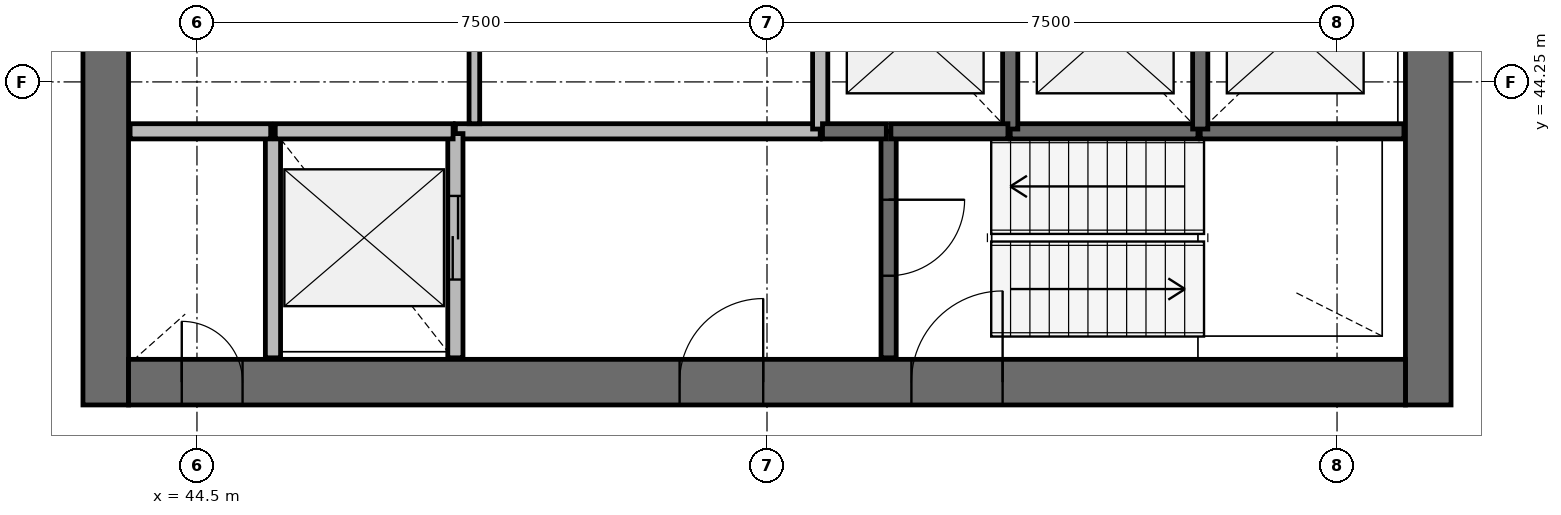
"""IFC4 building model, lengths in metres.
Left out: names, types, materials, properties, quantities, classifications, styles, units other than length and angle.
Written with IfcOpenShell. Run it as: python <this file> out.ifc"""

import sys

from ifc_helpers import new_model, si_unit, direction, frame, frame_2d, origin, place, context, subcontext, project, spatial, rectangle, extrude, source, transform, mapped, element, fill, save


model = new_model("IFC4")
c1 = context("Model", 3, precision=1e-05, world=origin(), true_north=direction((0.0, 1.0)))
c2 = subcontext(c1, "Body", "Model", "MODEL_VIEW")
j1 = project(units=[si_unit("LENGTHUNIT", "METRE"), si_unit("PLANEANGLEUNIT", "RADIAN")], contexts=[c1])
p1 = place(None, origin())
s1 = spatial("IfcSite", under=j1, at=p1, CompositionType="ELEMENT")
p2 = place(p1, origin())
s2 = spatial("IfcBuilding", under=s1, at=p2, CompositionType="ELEMENT")
p3 = place(p2, frame((0.0, 0.0, 218.9)))
s3 = spatial("IfcBuildingStorey", under=s2, at=p3, CompositionType="ELEMENT", Elevation=218.9)
p4 = place(p3, frame((60.7, 40.0, 0.0), z_axis=(0.0, 0.0, 1.0), x_axis=(0.0, 1.0, 0.0)))
e1 = element("IfcWall", 1, at=p4, inside=s3, PredefinedType="SHEAR", context=c2, shape_type="SweptSolid", body=[
    extrude(rectangle(XDim=16.0, YDim=0.6, at=frame_2d((8.0, 0.0))), origin(), (0.0, 0.0, 1.0), 3.9),
])
p5 = place(p4, frame((7.1, 0.0, 0.0)))
e2 = element("IfcOpeningElement", 2, at=p5, cuts=e1, PredefinedType="OPENING", context=c2, shape_type="SweptSolid", body=[
    extrude(rectangle(XDim=1.8, YDim=2.1, at=frame_2d((0.9, 1.05))), frame((0.0, 0.31, 0.0), z_axis=(0.0, -1.0, 0.0), x_axis=(1.0, 0.0, 0.0)), (0.0, 0.0, 1.0), 0.62),
])
p6 = place(p3, frame((43.3, 56.0, 0.0), z_axis=(0.0, 0.0, 1.0), x_axis=(0.0, -1.0, 0.0)))
e3 = element("IfcWall", 3, at=p6, inside=s3, PredefinedType="SHEAR", context=c2, shape_type="SweptSolid", body=[
    extrude(rectangle(XDim=16.0, YDim=0.6, at=frame_2d((8.0, 0.0))), origin(), (0.0, 0.0, 1.0), 3.9),
])
p7 = place(p6, frame((7.1, 0.0, 0.0)))
e4 = element("IfcOpeningElement", 4, at=p7, cuts=e3, PredefinedType="OPENING", context=c2, shape_type="SweptSolid", body=[
    extrude(rectangle(XDim=1.8, YDim=2.1, at=frame_2d((0.9, 1.05))), frame((0.0, 0.31, 0.0), z_axis=(0.0, -1.0, 0.0), x_axis=(1.0, 0.0, 0.0)), (0.0, 0.0, 1.0), 0.62),
])
p8 = place(p3, frame((43.6, 40.3, 0.0), z_axis=(0.0, 0.0, 1.0), x_axis=(1.0, 0.0, 0.0)))
e5 = element("IfcWall", 5, at=p8, inside=s3, PredefinedType="SHEAR", context=c2, shape_type="SweptSolid", body=[
    extrude(rectangle(XDim=16.8, YDim=0.6, at=frame_2d((8.4, 0.0))), origin(), (0.0, 0.0, 1.0), 3.9),
])
p9 = place(p8, frame((10.3, 0.0, 0.0)))
e6 = element("IfcOpeningElement", 6, at=p9, cuts=e5, PredefinedType="OPENING", context=c2, shape_type="SweptSolid", body=[
    extrude(rectangle(XDim=1.2, YDim=2.1, at=frame_2d((0.6, 1.05))), frame((0.0, 0.31, 0.0), z_axis=(0.0, -1.0, 0.0), x_axis=(1.0, 0.0, 0.0)), (0.0, 0.0, 1.0), 0.62),
])
p10 = place(p8, frame((7.25, 0.0, 0.0)))
e7 = element("IfcOpeningElement", 7, at=p10, cuts=e5, PredefinedType="OPENING", context=c2, shape_type="SweptSolid", body=[
    extrude(rectangle(XDim=1.1, YDim=2.1, at=frame_2d((0.55, 1.05))), frame((0.0, 0.31, 0.0), z_axis=(0.0, -1.0, 0.0), x_axis=(1.0, 0.0, 0.0)), (0.0, 0.0, 1.0), 0.62),
])
p11 = place(p8, frame((0.7, 0.0, 0.0)))
e8 = element("IfcOpeningElement", 8, at=p11, cuts=e5, PredefinedType="OPENING", context=c2, shape_type="SweptSolid", body=[
    extrude(rectangle(XDim=0.8, YDim=2.1, at=frame_2d((0.4, 1.05))), frame((0.0, 0.31, 0.0), z_axis=(0.0, -1.0, 0.0), x_axis=(1.0, 0.0, 0.0)), (0.0, 0.0, 1.0), 0.62),
])
p12 = place(p3, frame((52.7, 43.6, 0.0), z_axis=(0.0, 0.0, 1.0), x_axis=(-1.0, 0.0, 0.0)))
e9 = element("IfcWall", 9, at=p12, inside=s3, PredefinedType="SOLIDWALL", context=c2, shape_type="SweptSolid", body=[
    extrude(rectangle(XDim=4.8, YDim=0.2, at=frame_2d((2.4, 0.0))), origin(), (0.0, 0.0, 1.0), 3.58),
])
p13 = place(p3, frame((45.5, 43.6, 0.0), z_axis=(0.0, 0.0, 1.0), x_axis=(0.0, -1.0, 0.0)))
e10 = element("IfcWall", 10, at=p13, inside=s3, PredefinedType="SOLIDWALL", context=c2, shape_type="SweptSolid", body=[
    extrude(rectangle(XDim=2.98, YDim=0.2, at=frame_2d((1.49, 0.0))), origin(), (0.0, 0.0, 1.0), 3.58),
])
p14 = place(p3, frame((47.9, 40.62, 0.0), z_axis=(0.0, 0.0, 1.0), x_axis=(0.0, 1.0, 0.0)))
e11 = element("IfcWall", 11, at=p14, inside=s3, PredefinedType="SOLIDWALL", context=c2, shape_type="SweptSolid", body=[
    extrude(rectangle(XDim=2.95, YDim=0.2, at=frame_2d((1.475, 0.0))), origin(), (0.0, 0.0, 1.0), 3.58),
])
p15 = place(p14, frame((1.03, 0.0, 0.0)))
e12 = element("IfcOpeningElement", 12, at=p15, cuts=e11, PredefinedType="OPENING", context=c2, shape_type="SweptSolid", body=[
    extrude(rectangle(XDim=1.1, YDim=2.1, at=frame_2d((0.55, 1.05))), frame((0.0, 0.11, 0.0), z_axis=(0.0, -1.0, 0.0), x_axis=(1.0, 0.0, 0.0)), (0.0, 0.0, 1.0), 0.22),
])
p16 = place(p3, frame((53.6, 43.6, 0.0), z_axis=(0.0, 0.0, 1.0), x_axis=(0.0, -1.0, 0.0)))
e13 = element("IfcWall", 13, at=p16, inside=s3, PredefinedType="SOLIDWALL", context=c2, shape_type="SweptSolid", body=[
    extrude(rectangle(XDim=2.98, YDim=0.2, at=frame_2d((1.49, 0.0))), origin(), (0.0, 0.0, 1.0), 3.58),
])
p17 = place(p16, frame((0.9, 0.0, 0.0)))
e14 = element("IfcOpeningElement", 14, at=p17, cuts=e13, PredefinedType="OPENING", context=c2, shape_type="SweptSolid", body=[
    extrude(rectangle(XDim=1.0, YDim=2.1, at=frame_2d((0.5, 1.05))), frame((0.0, 0.11, 0.0), z_axis=(0.0, -1.0, 0.0), x_axis=(1.0, 0.0, 0.0)), (0.0, 0.0, 1.0), 0.22),
])
p18 = place(p3, frame((57.7, 43.6, 0.0), z_axis=(0.0, 0.0, 1.0), x_axis=(1.0, 0.0, 0.0)))
e15 = element("IfcWall", 15, at=p18, inside=s3, PredefinedType="SOLIDWALL", context=c2, shape_type="SweptSolid", body=[
    extrude(rectangle(XDim=2.68, YDim=0.2, at=frame_2d((1.34, 0.0))), origin(), (0.0, 0.0, 1.0), 3.58),
])
p19 = place(p3, frame((55.2, 43.6, 0.0), z_axis=(0.0, 0.0, 1.0), x_axis=(1.0, 0.0, 0.0)))
e16 = element("IfcWall", 16, at=p19, inside=s3, PredefinedType="SOLIDWALL", context=c2, shape_type="SweptSolid", body=[
    extrude(rectangle(XDim=2.47, YDim=0.2, at=frame_2d((1.235, 0.0))), origin(), (0.0, 0.0, 1.0), 3.58),
])
p20 = place(p3, frame((47.87, 43.6, 0.0), z_axis=(0.0, 0.0, 1.0), x_axis=(-1.0, 0.0, 0.0)))
e17 = element("IfcWall", 17, at=p20, inside=s3, PredefinedType="SOLIDWALL", context=c2, shape_type="SweptSolid", body=[
    extrude(rectangle(XDim=2.34, YDim=0.2, at=frame_2d((1.17, 0.0))), origin(), (0.0, 0.0, 1.0), 3.58),
])
for number, where, z_axis, x_axis in (
    (18, (52.7, 45.99, 0.0), (0.0, 0.0, 1.0), (0.0, -1.0, 0.0)),
    (19, (55.2, 43.63, 0.0), (0.0, 0.0, 1.0), (0.0, 1.0, 0.0)),
    (20, (57.7, 43.63, 0.0), (0.0, 0.0, 1.0), (0.0, 1.0, 0.0)),
):
    element("IfcWall", number, at=place(p3, frame(where, z_axis=z_axis, x_axis=x_axis)), inside=s3, PredefinedType="SOLIDWALL", context=c2, shape_type="SweptSolid", body=[
        extrude(rectangle(XDim=2.36, YDim=0.2, at=frame_2d((1.18, 0.0))), origin(), (0.0, 0.0, 1.0), 3.58),
    ])
p21 = place(p3, frame((45.47, 43.6, 0.0), z_axis=(0.0, 0.0, 1.0), x_axis=(-1.0, 0.0, 0.0)))
e21 = element("IfcWall", 21, at=p21, inside=s3, PredefinedType="SOLIDWALL", context=c2, shape_type="SweptSolid", body=[
    extrude(rectangle(XDim=1.85, YDim=0.2, at=frame_2d((0.925, 0.0))), origin(), (0.0, 0.0, 1.0), 3.58),
])
p22 = place(p3, frame((53.63, 43.6, 0.0), z_axis=(0.0, 0.0, 1.0), x_axis=(1.0, 0.0, 0.0)))
e22 = element("IfcWall", 22, at=p22, inside=s3, PredefinedType="SOLIDWALL", context=c2, shape_type="SweptSolid", body=[
    extrude(rectangle(XDim=1.54, YDim=0.2, at=frame_2d((0.77, 0.0))), origin(), (0.0, 0.0, 1.0), 3.58),
])
p23 = place(p3, frame((52.73, 43.6, 0.0), z_axis=(0.0, 0.0, 1.0), x_axis=(1.0, 0.0, 0.0)))
e23 = element("IfcWall", 23, at=p23, inside=s3, PredefinedType="SOLIDWALL", context=c2, shape_type="SweptSolid", body=[
    extrude(rectangle(XDim=0.84, YDim=0.2, at=frame_2d((0.42, 0.0))), origin(), (0.0, 0.0, 1.0), 3.58),
])
p24 = place(p3, frame((48.15, 43.7, 0.0), z_axis=(0.0, 0.0, 1.0), x_axis=(0.0, 1.0, 0.0)))
e24 = element("IfcWall", 24, at=p24, inside=s3, PredefinedType="PARTITIONING", context=c2, shape_type="SweptSolid", body=[
    extrude(rectangle(XDim=2.29, YDim=0.14, at=frame_2d((1.145, 0.0))), origin(), (0.0, 0.0, 1.0), 2.88),
])
m1 = source(origin(), c2, "Body", "SweptSolid", [
    extrude(rectangle(XDim=1.1, YDim=2.1, at=frame_2d((0.55, 1.05))), frame((0.0, 0.025, 0.0), z_axis=(0.0, -1.0, 0.0), x_axis=(1.0, 0.0, 0.0)), (0.0, 0.0, 1.0), 0.05),
])
p25 = place(p15, origin())
e25 = element("IfcDoor", 25, at=p25, inside=s3, OperationType="DOUBLE_DOOR_SLIDING", PredefinedType="USERDEFINED", context=c2, shape_type="MappedRepresentation", body=[
    mapped(m1, transform((0.0, 0.0, 0.0), scale=1.0)),
])
fill(e12, e25)
m2 = source(origin(), c2, "Body", "SweptSolid", [
    extrude(rectangle(XDim=1.2, YDim=2.1, at=frame_2d((0.6, 1.05))), frame((0.0, 0.025, 0.0), z_axis=(0.0, -1.0, 0.0), x_axis=(1.0, 0.0, 0.0)), (0.0, 0.0, 1.0), 0.05),
])
p26 = place(p9, origin())
e26 = element("IfcDoor", 26, at=p26, inside=s3, OperationType="SINGLE_SWING_RIGHT", PredefinedType="DOOR", context=c2, shape_type="MappedRepresentation", body=[
    mapped(m2, transform((0.0, 0.0, 0.0), scale=1.0)),
])
fill(e6, e26)
m3 = source(origin(), c2, "Body", "SweptSolid", [
    extrude(rectangle(XDim=1.0, YDim=2.1, at=frame_2d((0.5, 1.05))), frame((0.0, 0.025, 0.0), z_axis=(0.0, -1.0, 0.0), x_axis=(1.0, 0.0, 0.0)), (0.0, 0.0, 1.0), 0.05),
])
p27 = place(p17, origin())
e27 = element("IfcDoor", 27, at=p27, inside=s3, OperationType="SINGLE_SWING_LEFT", PredefinedType="DOOR", context=c2, shape_type="MappedRepresentation", body=[
    mapped(m3, transform((0.0, 0.0, 0.0), scale=1.0)),
])
fill(e14, e27)
m4 = source(origin(), c2, "Body", "SweptSolid", [
    extrude(rectangle(XDim=1.1, YDim=2.1, at=frame_2d((0.55, 1.05))), frame((0.0, 0.025, 0.0), z_axis=(0.0, -1.0, 0.0), x_axis=(1.0, 0.0, 0.0)), (0.0, 0.0, 1.0), 0.05),
])
p28 = place(p10, origin())
e28 = element("IfcDoor", 28, at=p28, inside=s3, OperationType="SINGLE_SWING_RIGHT", PredefinedType="DOOR", context=c2, shape_type="MappedRepresentation", body=[
    mapped(m4, transform((0.0, 0.0, 0.0), scale=1.0)),
])
fill(e7, e28)
m5 = source(origin(), c2, "Body", "SweptSolid", [
    extrude(rectangle(XDim=0.8, YDim=2.1, at=frame_2d((0.4, 1.05))), frame((0.0, 0.025, 0.0), z_axis=(0.0, -1.0, 0.0), x_axis=(1.0, 0.0, 0.0)), (0.0, 0.0, 1.0), 0.05),
])
p29 = place(p11, origin())
e29 = element("IfcDoor", 29, at=p29, inside=s3, OperationType="SINGLE_SWING_LEFT", PredefinedType="DOOR", context=c2, shape_type="MappedRepresentation", body=[
    mapped(m5, transform((0.0, 0.0, 0.0), scale=1.0)),
])
fill(e8, e29)
save(model, sys.argv[1])
